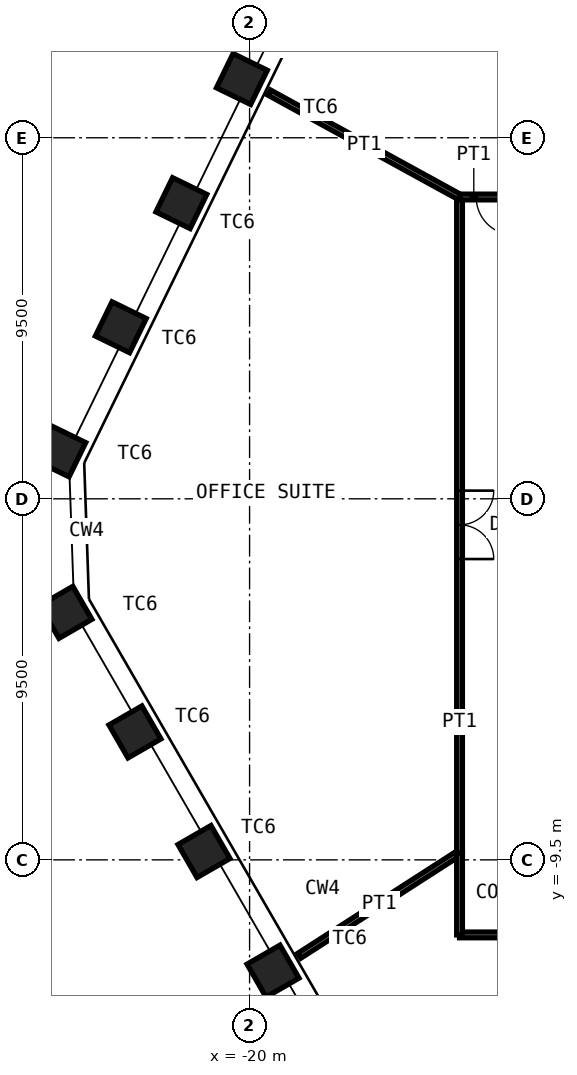
"""IFC4 building model, lengths in metres.
Left out: names, types, materials, properties, quantities, classifications, styles, units other than length and angle.
Written with IfcOpenShell. Run it as: python <this file> out.ifc"""

import sys

from ifc_helpers import new_model, si_unit, direction, frame, frame_2d, origin, origin_2d, place, context, subcontext, project, spatial, rectangle, hollow_rectangle, extrude, element, fill, save


model = new_model("IFC4")
c1 = context("Model", 3, precision=1e-05, world=origin(), true_north=direction((0.0, 1.0)))
c2 = subcontext(c1, "Body", "Model", "MODEL_VIEW")
j1 = project(units=[si_unit("LENGTHUNIT", "METRE"), si_unit("PLANEANGLEUNIT", "RADIAN")], contexts=[c1])
p1 = place(None, origin())
s1 = spatial("IfcSite", under=j1, at=p1, CompositionType="ELEMENT")
p2 = place(p1, origin())
s2 = spatial("IfcBuilding", under=s1, at=p2, CompositionType="ELEMENT")
p3 = place(p2, frame((0.0, 0.0, 222.4)))
s3 = spatial("IfcBuildingStorey", under=s2, at=p3, CompositionType="ELEMENT", Elevation=222.4)
for number, where, z_axis, x_axis in (
    (1, (-19.383, -12.428, 0.0), (0.0, 0.0, 1.0), (0.5, -0.866, 0.0)),
    (2, (-21.2, -9.281, 0.0), (0.0, 0.0, 1.0), (0.5, -0.866, 0.0)),
    (3, (-23.016, -6.134, 0.0), (0.0, 0.0, 1.0), (0.5, -0.866, 0.0)),
    (4, (-24.833, -2.988, 0.0), (0.0, 0.0, 1.0), (0.5, -0.866, 0.0)),
    (5, (-24.981, 1.248, 0.0), (0.0, 0.0, 1.0), (-0.438, -0.899, 0.0)),
    (6, (-23.388, 4.514, 0.0), (0.0, 0.0, 1.0), (-0.438, -0.899, 0.0)),
    (7, (-21.795, 7.78, 0.0), (0.0, 0.0, 1.0), (-0.438, -0.899, 0.0)),
    (8, (-20.203, 11.045, 0.0), (0.0, 0.0, 1.0), (-0.438, -0.899, 0.0)),
):
    element("IfcColumn", number, at=place(p3, frame(where, z_axis=z_axis, x_axis=x_axis)), inside=s3, PredefinedType="COLUMN", context=c2, shape_type="SweptSolid", body=[
        extrude(hollow_rectangle(XDim=1.0, YDim=1.0, WallThickness=0.06, at=origin_2d()), origin(), (0.0, 0.0, 1.0), 4.2),
    ])
p4 = place(p3, frame((-18.693, -12.024, 0.0), z_axis=(0.0, 0.0, 1.0), x_axis=(0.841031335058, 0.540986407824, 0.0)))
e9 = element("IfcWall", 9, at=p4, inside=s3, PredefinedType="PARTITIONING", context=c2, shape_type="SweptSolid", body=[
    extrude(rectangle(XDim=5.015, YDim=0.15, at=frame_2d((2.507, 0.0))), origin(), (0.0, 0.0, 1.0), 3.43),
])
p5 = place(p3, frame((-14.475, -9.311, 0.0), z_axis=(0.0, 0.0, 1.0), x_axis=(0.0, 1.0, 0.0)))
e10 = element("IfcWall", 10, at=p5, inside=s3, PredefinedType="PARTITIONING", context=c2, shape_type="SweptSolid", body=[
    extrude(rectangle(XDim=17.252, YDim=0.15, at=frame_2d((8.626, 0.0))), origin(), (0.0, 0.0, 1.0), 4.03),
])
p6 = place(p5, frame((7.726, 0.0, 0.0)))
e11 = element("IfcOpeningElement", 11, at=p6, cuts=e10, PredefinedType="OPENING", context=c2, shape_type="SweptSolid", body=[
    extrude(rectangle(XDim=1.8, YDim=2.4, at=frame_2d((0.9, 1.2))), frame((0.0, 0.085, 0.0), z_axis=(0.0, -1.0, 0.0), x_axis=(1.0, 0.0, 0.0)), (0.0, 0.0, 1.0), 0.17),
])
p7 = place(p3, frame((-19.486, 10.69, 0.0), z_axis=(0.0, 0.0, 1.0), x_axis=(0.876724089264, -0.480993629172, 0.0)))
e12 = element("IfcWall", 12, at=p7, inside=s3, PredefinedType="PARTITIONING", context=c2, shape_type="SweptSolid", body=[
    extrude(rectangle(XDim=5.715, YDim=0.15, at=frame_2d((2.858, 0.0))), origin(), (0.0, 0.0, 1.0), 3.43),
])
p8 = place(p3, frame((-14.475, 7.941, 0.0), z_axis=(0.0, 0.0, 1.0), x_axis=(1.0, 0.0, 0.0)))
e13 = element("IfcWall", 13, at=p8, inside=s3, PredefinedType="PARTITIONING", context=c2, shape_type="SweptSolid", body=[
    extrude(rectangle(XDim=1.875, YDim=0.15, at=frame_2d((0.938, 0.0))), origin(), (0.0, 0.0, 1.0), 4.03),
])
p9 = place(p8, frame((0.438, 0.0, 0.0)))
e14 = element("IfcOpeningElement", 14, at=p9, cuts=e13, PredefinedType="OPENING", context=c2, shape_type="SweptSolid", body=[
    extrude(rectangle(XDim=1.0, YDim=2.4, at=frame_2d((0.5, 1.2))), frame((0.0, 0.085, 0.0), z_axis=(0.0, -1.0, 0.0), x_axis=(1.0, 0.0, 0.0)), (0.0, 0.0, 1.0), 0.17),
])
p10 = place(p3, frame((-14.737, 20.455, 0.0), z_axis=(0.0, 0.0, 1.0), x_axis=(0.584547025688, -0.811359830629, 0.0)))
e15 = element("IfcWall", 15, at=p10, inside=s3, PredefinedType="PARTITIONING", context=c2, shape_type="SweptSolid", body=[
    extrude(rectangle(XDim=11.068, YDim=0.15, at=frame_2d((5.534, 0.0))), origin(), (0.0, 0.0, 1.0), 2.93),
])
p11 = place(p3, frame((-15.08, -18.294, 0.0), z_axis=(0.0, 0.0, 1.0), x_axis=(0.636052894953, 0.771645459277, 0.0)))
e16 = element("IfcWall", 16, at=p11, inside=s3, PredefinedType="PARTITIONING", context=c2, shape_type="SweptSolid", body=[
    extrude(rectangle(XDim=8.837, YDim=0.15, at=frame_2d((4.418, 0.0))), origin(), (0.0, 0.0, 1.0), 3.43),
])
p12 = place(p3, frame((-9.459, -11.475, 0.0), z_axis=(0.0, 0.0, 1.0), x_axis=(-1.0, 0.0, 0.0)))
e17 = element("IfcWall", 17, at=p12, inside=s3, PredefinedType="PARTITIONING", context=c2, shape_type="SweptSolid", body=[
    extrude(rectangle(XDim=5.016, YDim=0.15, at=frame_2d((2.508, 0.0))), origin(), (0.0, 0.0, 1.0), 4.03),
])
p13 = place(p12, frame((2.008, 0.0, 0.0)))
e18 = element("IfcOpeningElement", 18, at=p13, cuts=e17, PredefinedType="OPENING", context=c2, shape_type="SweptSolid", body=[
    extrude(rectangle(XDim=1.0, YDim=2.4, at=frame_2d((0.5, 1.2))), frame((0.0, 0.085, 0.0), z_axis=(0.0, -1.0, 0.0), x_axis=(1.0, 0.0, 0.0)), (0.0, 0.0, 1.0), 0.17),
])
p14 = place(p3, frame((-14.475, -11.475, 0.0), z_axis=(0.0, 0.0, 1.0), x_axis=(0.0, 1.0, 0.0)))
e19 = element("IfcWall", 19, at=p14, inside=s3, PredefinedType="PARTITIONING", context=c2, shape_type="SweptSolid", body=[
    extrude(rectangle(XDim=2.164, YDim=0.15, at=frame_2d((1.082, 0.0))), origin(), (0.0, 0.0, 1.0), 4.03),
])
p15 = place(p6, origin())
e20 = element("IfcDoor", 20, at=p15, inside=s3, OperationType="DOUBLE_DOOR_DOUBLE_SWING", PredefinedType="DOOR", context=c2, shape_type="SweptSolid", body=[
    extrude(rectangle(XDim=1.8, YDim=2.4, at=frame_2d((0.9, 1.2))), frame((0.0, 0.025, 0.0), z_axis=(0.0, -1.0, 0.0), x_axis=(1.0, 0.0, 0.0)), (0.0, 0.0, 1.0), 0.05),
])
fill(e11, e20)
p16 = place(p9, origin())
e21 = element("IfcDoor", 21, at=p16, inside=s3, OperationType="SINGLE_SWING_RIGHT", PredefinedType="DOOR", context=c2, shape_type="SweptSolid", body=[
    extrude(rectangle(XDim=1.0, YDim=2.4, at=frame_2d((0.5, 1.2))), frame((0.0, 0.025, 0.0), z_axis=(0.0, -1.0, 0.0), x_axis=(1.0, 0.0, 0.0)), (0.0, 0.0, 1.0), 0.05),
])
fill(e14, e21)
save(model, sys.argv[1])
